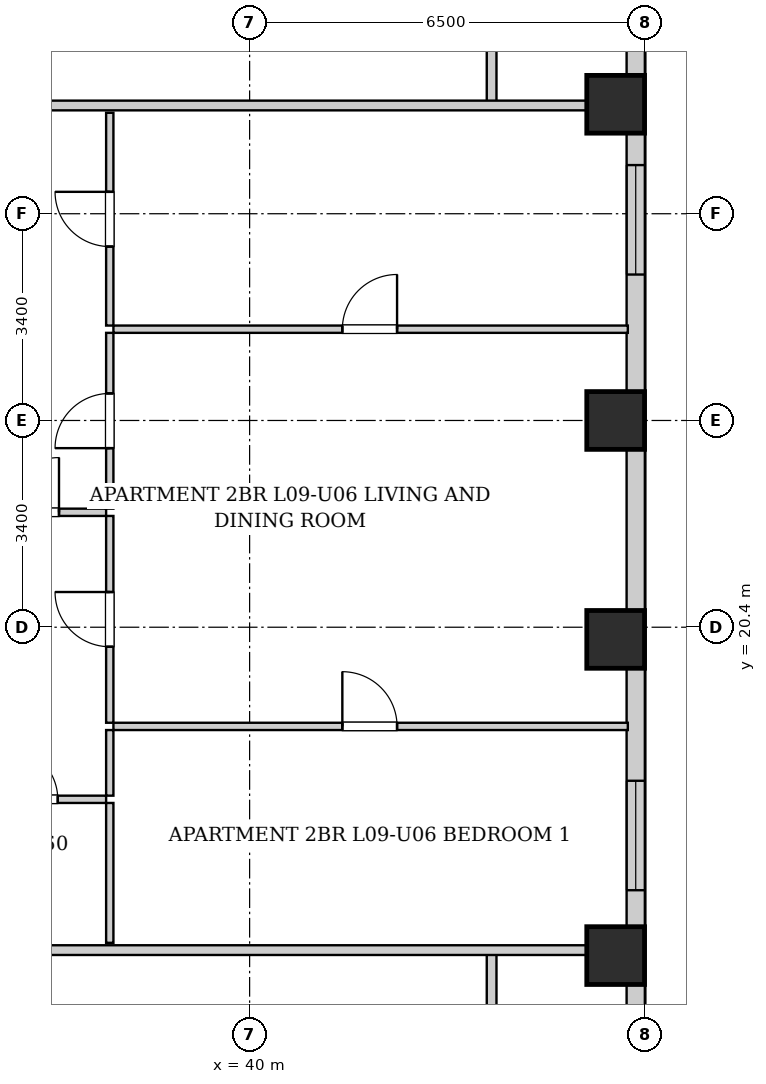
"""IFC4 building model, lengths in metres.
Left out: names, types, materials, properties, quantities, classifications, styles, units other than length and angle.
Written with IfcOpenShell. Run it as: python <this file> out.ifc"""

import sys

from ifc_helpers import new_model, si_unit, direction, frame, frame_2d, origin, origin_2d, place, context, subcontext, project, spatial, rectangle, extrude, element, fill, save


model = new_model("IFC4")
c1 = context("Model", 3, precision=1e-05, world=origin(), true_north=direction((0.0, 1.0)))
c2 = subcontext(c1, "Body", "Model", "MODEL_VIEW")
j1 = project(units=[si_unit("LENGTHUNIT", "METRE"), si_unit("PLANEANGLEUNIT", "RADIAN")], contexts=[c1])
p1 = place(None, origin())
s1 = spatial("IfcSite", under=j1, at=p1, CompositionType="ELEMENT")
p2 = place(p1, origin())
s2 = spatial("IfcBuilding", under=s1, at=p2, CompositionType="ELEMENT")
p3 = place(p2, frame((0.0, 0.0, 38.6)))
s3 = spatial("IfcBuildingStorey", under=s2, at=p3, CompositionType="ELEMENT", Elevation=38.6)
for number, where, z_axis, x_axis in (
    (1, (46.02, 15.0, 0.0), (0.0, 0.0, 1.0), (1.0, 0.0, 0.0)),
    (2, (46.02, 20.2, 0.0), (0.0, 0.0, 1.0), (1.0, 0.0, 0.0)),
    (3, (46.02, 23.8, 0.0), (0.0, 0.0, 1.0), (1.0, 0.0, 0.0)),
    (4, (46.02, 29.0, 0.0), (0.0, 0.0, 1.0), (1.0, 0.0, 0.0)),
):
    element("IfcColumn", number, at=place(p3, frame(where, z_axis=z_axis, x_axis=x_axis)), inside=s3, PredefinedType="COLUMN", context=c2, shape_type="SweptSolid", body=[
        extrude(rectangle(XDim=0.95, YDim=0.95, at=origin_2d()), origin(), (0.0, 0.0, 1.0), 3.2),
    ])
p4 = place(p3, frame((46.35, 45.1, 0.0), z_axis=(0.0, 0.0, 1.0), x_axis=(0.0, -1.0, 0.0)))
e5 = element("IfcWall", 5, at=p4, inside=s3, PredefinedType="SOLIDWALL", context=c2, shape_type="SweptSolid", body=[
    extrude(rectangle(XDim=42.6, YDim=0.3, at=frame_2d((21.3, 0.0))), origin(), (0.0, 0.0, 1.0), 1.975),
])
p5 = place(p4, frame((37.575, 0.0, 0.55)))
e6 = element("IfcOpeningElement", 6, at=p5, cuts=e5, PredefinedType="OPENING", context=c2, shape_type="SweptSolid", body=[
    extrude(rectangle(XDim=1.8, YDim=1.2, at=frame_2d((0.9, 0.6))), frame((0.0, 0.16, 0.0), z_axis=(0.0, -1.0, 0.0), x_axis=(1.0, 0.0, 0.0)), (0.0, 0.0, 1.0), 0.32),
])
p6 = place(p4, frame((34.85, 0.0, 0.55)))
e7 = element("IfcOpeningElement", 7, at=p6, cuts=e5, PredefinedType="OPENING", context=c2, shape_type="SweptSolid", body=[
    extrude(rectangle(XDim=1.35, YDim=1.2, at=frame_2d((0.675, 0.6))), frame((0.0, 0.16, 0.0), z_axis=(0.0, -1.0, 0.0), x_axis=(1.0, 0.0, 0.0)), (0.0, 0.0, 1.0), 0.32),
])
p7 = place(p4, frame((3.665, 0.0, 0.55)))
e8 = element("IfcOpeningElement", 8, at=p7, cuts=e5, PredefinedType="OPENING", context=c2, shape_type="SweptSolid", body=[
    extrude(rectangle(XDim=1.8, YDim=1.2, at=frame_2d((0.9, 0.6))), frame((0.0, 0.16, 0.0), z_axis=(0.0, -1.0, 0.0), x_axis=(1.0, 0.0, 0.0)), (0.0, 0.0, 1.0), 0.32),
])
p8 = place(p4, frame((1.185, 0.0, 0.55)))
e9 = element("IfcOpeningElement", 9, at=p8, cuts=e5, PredefinedType="OPENING", context=c2, shape_type="SweptSolid", body=[
    extrude(rectangle(XDim=1.35, YDim=1.2, at=frame_2d((0.675, 0.6))), frame((0.0, 0.16, 0.0), z_axis=(0.0, -1.0, 0.0), x_axis=(1.0, 0.0, 0.0)), (0.0, 0.0, 1.0), 0.32),
])
p9 = place(p4, frame((27.225, 0.0, 0.55)))
e10 = element("IfcOpeningElement", 10, at=p9, cuts=e5, PredefinedType="OPENING", context=c2, shape_type="SweptSolid", body=[
    extrude(rectangle(XDim=1.8, YDim=1.2, at=frame_2d((0.9, 0.6))), frame((0.0, 0.16, 0.0), z_axis=(0.0, -1.0, 0.0), x_axis=(1.0, 0.0, 0.0)), (0.0, 0.0, 1.0), 0.32),
])
p10 = place(p4, frame((17.1, 0.0, 0.55)))
e11 = element("IfcOpeningElement", 11, at=p10, cuts=e5, PredefinedType="OPENING", context=c2, shape_type="SweptSolid", body=[
    extrude(rectangle(XDim=1.8, YDim=1.2, at=frame_2d((0.9, 0.6))), frame((0.0, 0.16, 0.0), z_axis=(0.0, -1.0, 0.0), x_axis=(1.0, 0.0, 0.0)), (0.0, 0.0, 1.0), 0.32),
])
for number, where, z_axis, x_axis in (
    (12, (43.98, 13.35, 0.0), (0.0, 0.0, 1.0), (0.0, 1.0, 0.0)),
    (13, (43.98, 28.98, 0.0), (0.0, 0.0, 1.0), (0.0, 1.0, 0.0)),
):
    element("IfcWall", number, at=place(p3, frame(where, z_axis=z_axis, x_axis=x_axis)), inside=s3, PredefinedType="PARTITIONING", context=c2, shape_type="SweptSolid", body=[
        extrude(rectangle(XDim=1.74, YDim=0.16, at=frame_2d((0.87, 0.0))), origin(), (0.0, 0.0, 1.0), 2.94),
    ])
for number, where, z_axis, x_axis in (
    (14, (35.11, 15.09, 0.0), (0.0, 0.0, 1.0), (1.0, 0.0, 0.0)),
    (15, (35.11, 28.98, 0.0), (0.0, 0.0, 1.0), (1.0, 0.0, 0.0)),
):
    element("IfcWall", number, at=place(p3, frame(where, z_axis=z_axis, x_axis=x_axis)), inside=s3, PredefinedType="PARTITIONING", context=c2, shape_type="SweptSolid", body=[
        extrude(rectangle(XDim=11.11, YDim=0.16, at=frame_2d((5.555, 0.0))), origin(), (0.0, 0.0, 1.0), 2.155),
    ])
p11 = place(p3, frame((35.19, 22.29, 0.0), z_axis=(0.0, 0.0, 1.0), x_axis=(1.0, 0.0, 0.0)))
e16 = element("IfcWall", 16, at=p11, inside=s3, PredefinedType="PARTITIONING", context=c2, shape_type="SweptSolid", body=[
    extrude(rectangle(XDim=2.45, YDim=0.12, at=frame_2d((1.225, 0.0))), origin(), (0.0, 0.0, 1.0), 2.94),
])
p12 = place(p11, frame((0.775, 0.0, 0.0)))
e17 = element("IfcOpeningElement", 17, at=p12, cuts=e16, PredefinedType="OPENING", context=c2, shape_type="SweptSolid", body=[
    extrude(rectangle(XDim=0.9, YDim=2.05, at=frame_2d((0.45, 1.025))), frame((0.0, 0.07, 0.0), z_axis=(0.0, -1.0, 0.0), x_axis=(1.0, 0.0, 0.0)), (0.0, 0.0, 1.0), 0.14),
])
p13 = place(p3, frame((37.7, 22.35, 0.0), z_axis=(0.0, 0.0, 1.0), x_axis=(0.0, 1.0, 0.0)))
e18 = element("IfcWall", 18, at=p13, inside=s3, PredefinedType="PARTITIONING", context=c2, shape_type="SweptSolid", body=[
    extrude(rectangle(XDim=2.891, YDim=0.12, at=frame_2d((1.445, 0.0))), origin(), (0.0, 0.0, 1.0), 2.94),
])
p14 = place(p13, frame((0.995, 0.0, 0.0)))
e19 = element("IfcOpeningElement", 19, at=p14, cuts=e18, PredefinedType="OPENING", context=c2, shape_type="SweptSolid", body=[
    extrude(rectangle(XDim=0.9, YDim=2.05, at=frame_2d((0.45, 1.025))), frame((0.0, 0.07, 0.0), z_axis=(0.0, -1.0, 0.0), x_axis=(1.0, 0.0, 0.0)), (0.0, 0.0, 1.0), 0.14),
])
p15 = place(p3, frame((37.7, 25.361, 0.0), z_axis=(0.0, 0.0, 1.0), x_axis=(0.0, 1.0, 0.0)))
e20 = element("IfcWall", 20, at=p15, inside=s3, PredefinedType="PARTITIONING", context=c2, shape_type="SweptSolid", body=[
    extrude(rectangle(XDim=3.499, YDim=0.12, at=frame_2d((1.75, 0.0))), origin(), (0.0, 0.0, 1.0), 2.94),
])
p16 = place(p15, frame((1.299, 0.0, 0.0)))
e21 = element("IfcOpeningElement", 21, at=p16, cuts=e20, PredefinedType="OPENING", context=c2, shape_type="SweptSolid", body=[
    extrude(rectangle(XDim=0.9, YDim=2.05, at=frame_2d((0.45, 1.025))), frame((0.0, 0.07, 0.0), z_axis=(0.0, -1.0, 0.0), x_axis=(1.0, 0.0, 0.0)), (0.0, 0.0, 1.0), 0.14),
])
p17 = place(p3, frame((35.19, 17.57, 0.0), z_axis=(0.0, 0.0, 1.0), x_axis=(1.0, 0.0, 0.0)))
e22 = element("IfcWall", 22, at=p17, inside=s3, PredefinedType="PARTITIONING", context=c2, shape_type="SweptSolid", body=[
    extrude(rectangle(XDim=2.45, YDim=0.12, at=frame_2d((1.225, 0.0))), origin(), (0.0, 0.0, 1.0), 2.94),
])
p18 = place(p17, frame((0.795, 0.0, 0.0)))
e23 = element("IfcOpeningElement", 23, at=p18, cuts=e22, PredefinedType="OPENING", context=c2, shape_type="SweptSolid", body=[
    extrude(rectangle(XDim=0.86, YDim=2.05, at=frame_2d((0.43, 1.025))), frame((0.0, 0.07, 0.0), z_axis=(0.0, -1.0, 0.0), x_axis=(1.0, 0.0, 0.0)), (0.0, 0.0, 1.0), 0.14),
])
p19 = place(p3, frame((37.7, 15.21, 0.0), z_axis=(0.0, 0.0, 1.0), x_axis=(0.0, 1.0, 0.0)))
e24 = element("IfcWall", 24, at=p19, inside=s3, PredefinedType="PARTITIONING", context=c2, shape_type="SweptSolid", body=[
    extrude(rectangle(XDim=2.3, YDim=0.12, at=frame_2d((1.15, 0.0))), origin(), (0.0, 0.0, 1.0), 2.94),
])
p20 = place(p3, frame((37.7, 17.63, 0.0), z_axis=(0.0, 0.0, 1.0), x_axis=(0.0, 1.0, 0.0)))
e25 = element("IfcWall", 25, at=p20, inside=s3, PredefinedType="PARTITIONING", context=c2, shape_type="SweptSolid", body=[
    extrude(rectangle(XDim=1.079, YDim=0.12, at=frame_2d((0.54, 0.0))), origin(), (0.0, 0.0, 1.0), 2.94),
])
p21 = place(p3, frame((37.7, 18.829, 0.0), z_axis=(0.0, 0.0, 1.0), x_axis=(0.0, 1.0, 0.0)))
e26 = element("IfcWall", 26, at=p21, inside=s3, PredefinedType="PARTITIONING", context=c2, shape_type="SweptSolid", body=[
    extrude(rectangle(XDim=3.401, YDim=0.12, at=frame_2d((1.7, 0.0))), origin(), (0.0, 0.0, 1.0), 2.94),
])
p22 = place(p21, frame((1.25, 0.0, 0.0)))
e27 = element("IfcOpeningElement", 27, at=p22, cuts=e26, PredefinedType="OPENING", context=c2, shape_type="SweptSolid", body=[
    extrude(rectangle(XDim=0.9, YDim=2.05, at=frame_2d((0.45, 1.025))), frame((0.0, 0.07, 0.0), z_axis=(0.0, -1.0, 0.0), x_axis=(1.0, 0.0, 0.0)), (0.0, 0.0, 1.0), 0.14),
])
p23 = place(p3, frame((37.76, 18.769, 0.0), z_axis=(0.0, 0.0, 1.0), x_axis=(1.0, 0.0, 0.0)))
e28 = element("IfcWall", 28, at=p23, inside=s3, PredefinedType="PARTITIONING", context=c2, shape_type="SweptSolid", body=[
    extrude(rectangle(XDim=8.46, YDim=0.12, at=frame_2d((4.23, 0.0))), origin(), (0.0, 0.0, 1.0), 2.94),
])
p24 = place(p23, frame((3.765, 0.0, 0.0)))
e29 = element("IfcOpeningElement", 29, at=p24, cuts=e28, PredefinedType="OPENING", context=c2, shape_type="SweptSolid", body=[
    extrude(rectangle(XDim=0.9, YDim=2.05, at=frame_2d((0.45, 1.025))), frame((0.0, 0.07, 0.0), z_axis=(0.0, -1.0, 0.0), x_axis=(1.0, 0.0, 0.0)), (0.0, 0.0, 1.0), 0.14),
])
p25 = place(p3, frame((37.76, 25.301, 0.0), z_axis=(0.0, 0.0, 1.0), x_axis=(1.0, 0.0, 0.0)))
e30 = element("IfcWall", 30, at=p25, inside=s3, PredefinedType="PARTITIONING", context=c2, shape_type="SweptSolid", body=[
    extrude(rectangle(XDim=8.46, YDim=0.12, at=frame_2d((4.23, 0.0))), origin(), (0.0, 0.0, 1.0), 2.94),
])
p26 = place(p25, frame((3.765, 0.0, 0.0)))
e31 = element("IfcOpeningElement", 31, at=p26, cuts=e30, PredefinedType="OPENING", context=c2, shape_type="SweptSolid", body=[
    extrude(rectangle(XDim=0.9, YDim=2.05, at=frame_2d((0.45, 1.025))), frame((0.0, 0.07, 0.0), z_axis=(0.0, -1.0, 0.0), x_axis=(1.0, 0.0, 0.0)), (0.0, 0.0, 1.0), 0.14),
])
p27 = place(p12, origin())
e32 = element("IfcDoor", 32, at=p27, inside=s3, OperationType="SINGLE_SWING_RIGHT", PredefinedType="DOOR", context=c2, shape_type="SweptSolid", body=[
    extrude(rectangle(XDim=0.9, YDim=2.05, at=frame_2d((0.45, 1.025))), frame((0.0, 0.025, 0.0), z_axis=(0.0, -1.0, 0.0), x_axis=(1.0, 0.0, 0.0)), (0.0, 0.0, 1.0), 0.05),
])
fill(e17, e32)
p28 = place(p14, origin())
e33 = element("IfcDoor", 33, at=p28, inside=s3, OperationType="SINGLE_SWING_LEFT", PredefinedType="DOOR", context=c2, shape_type="SweptSolid", body=[
    extrude(rectangle(XDim=0.9, YDim=2.05, at=frame_2d((0.45, 1.025))), frame((0.0, 0.025, 0.0), z_axis=(0.0, -1.0, 0.0), x_axis=(1.0, 0.0, 0.0)), (0.0, 0.0, 1.0), 0.05),
])
fill(e19, e33)
p29 = place(p16, origin())
e34 = element("IfcDoor", 34, at=p29, inside=s3, OperationType="SINGLE_SWING_RIGHT", PredefinedType="DOOR", context=c2, shape_type="SweptSolid", body=[
    extrude(rectangle(XDim=0.9, YDim=2.05, at=frame_2d((0.45, 1.025))), frame((0.0, 0.025, 0.0), z_axis=(0.0, -1.0, 0.0), x_axis=(1.0, 0.0, 0.0)), (0.0, 0.0, 1.0), 0.05),
])
fill(e21, e34)
p30 = place(p18, origin())
e35 = element("IfcDoor", 35, at=p30, inside=s3, OperationType="SINGLE_SWING_LEFT", PredefinedType="DOOR", context=c2, shape_type="SweptSolid", body=[
    extrude(rectangle(XDim=0.86, YDim=2.05, at=frame_2d((0.43, 1.025))), frame((0.0, 0.025, 0.0), z_axis=(0.0, -1.0, 0.0), x_axis=(1.0, 0.0, 0.0)), (0.0, 0.0, 1.0), 0.05),
])
fill(e23, e35)
p31 = place(p22, origin())
e36 = element("IfcDoor", 36, at=p31, inside=s3, OperationType="SINGLE_SWING_RIGHT", PredefinedType="DOOR", context=c2, shape_type="SweptSolid", body=[
    extrude(rectangle(XDim=0.9, YDim=2.05, at=frame_2d((0.45, 1.025))), frame((0.0, 0.025, 0.0), z_axis=(0.0, -1.0, 0.0), x_axis=(1.0, 0.0, 0.0)), (0.0, 0.0, 1.0), 0.05),
])
fill(e27, e36)
p32 = place(p24, origin())
e37 = element("IfcDoor", 37, at=p32, inside=s3, OperationType="SINGLE_SWING_LEFT", PredefinedType="DOOR", context=c2, shape_type="SweptSolid", body=[
    extrude(rectangle(XDim=0.9, YDim=2.05, at=frame_2d((0.45, 1.025))), frame((0.0, 0.025, 0.0), z_axis=(0.0, -1.0, 0.0), x_axis=(1.0, 0.0, 0.0)), (0.0, 0.0, 1.0), 0.05),
])
fill(e29, e37)
p33 = place(p26, origin())
e38 = element("IfcDoor", 38, at=p33, inside=s3, OperationType="SINGLE_SWING_RIGHT", PredefinedType="DOOR", context=c2, shape_type="SweptSolid", body=[
    extrude(rectangle(XDim=0.9, YDim=2.05, at=frame_2d((0.45, 1.025))), frame((0.0, 0.025, 0.0), z_axis=(0.0, -1.0, 0.0), x_axis=(1.0, 0.0, 0.0)), (0.0, 0.0, 1.0), 0.05),
])
fill(e31, e38)
p34 = place(p9, origin())
e39 = element("IfcWindow", 39, at=p34, inside=s3, PartitioningType="DOUBLE_PANEL_VERTICAL", PredefinedType="WINDOW", context=c2, shape_type="SweptSolid", body=[
    extrude(rectangle(XDim=1.8, YDim=1.2, at=frame_2d((0.9, 0.6))), frame((0.0, 0.03, 0.0), z_axis=(0.0, -1.0, 0.0), x_axis=(1.0, 0.0, 0.0)), (0.0, 0.0, 1.0), 0.06),
])
fill(e10, e39)
p35 = place(p10, origin())
e40 = element("IfcWindow", 40, at=p35, inside=s3, PartitioningType="DOUBLE_PANEL_VERTICAL", PredefinedType="WINDOW", context=c2, shape_type="SweptSolid", body=[
    extrude(rectangle(XDim=1.8, YDim=1.2, at=frame_2d((0.9, 0.6))), frame((0.0, 0.03, 0.0), z_axis=(0.0, -1.0, 0.0), x_axis=(1.0, 0.0, 0.0)), (0.0, 0.0, 1.0), 0.06),
])
fill(e11, e40)
save(model, sys.argv[1])
